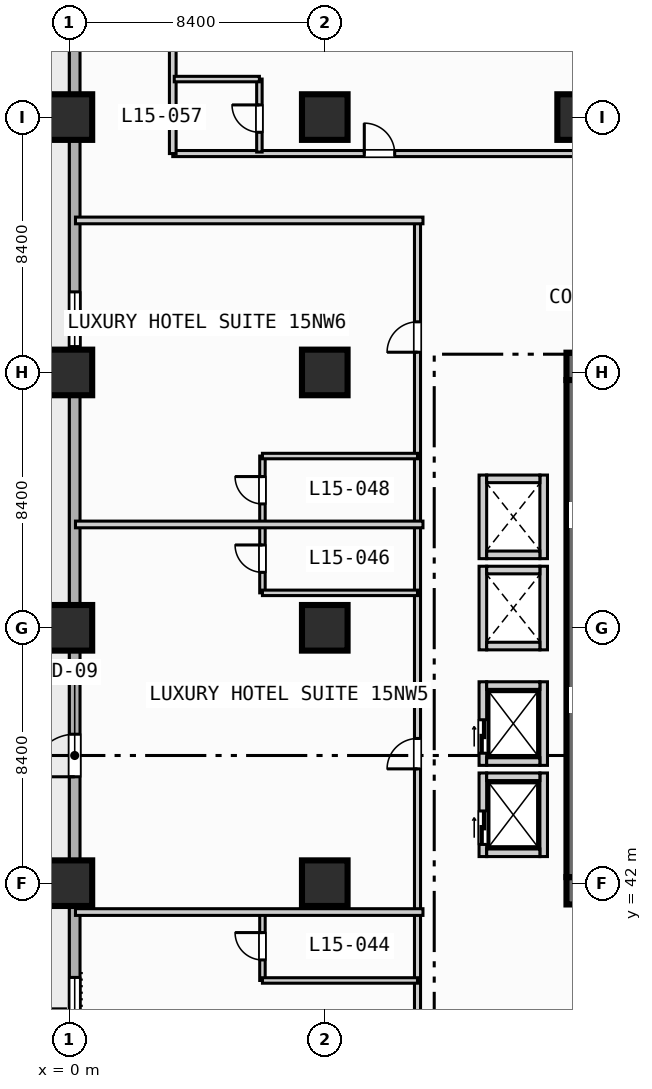
"""IFC4 building model, lengths in metres.
Left out: names, types, materials, properties, quantities, classifications, styles, units other than length and angle.
Written with IfcOpenShell. Run it as: python <this file> out.ifc"""

import sys

from ifc_helpers import new_model, si_unit, direction, frame, frame_2d, origin, origin_2d, place, context, subcontext, project, spatial, rectangle, extrude, element, fill, save


model = new_model("IFC4")
c1 = context("Model", 3, precision=1e-05, world=origin(), true_north=direction((0.0, 1.0)))
c2 = subcontext(c1, "Body", "Model", "MODEL_VIEW")
j1 = project(units=[si_unit("LENGTHUNIT", "METRE"), si_unit("PLANEANGLEUNIT", "RADIAN")], contexts=[c1])
p1 = place(None, origin())
s1 = spatial("IfcSite", under=j1, at=p1, CompositionType="ELEMENT")
p2 = place(p1, origin())
s2 = spatial("IfcBuilding", under=s1, at=p2, CompositionType="ELEMENT")
p3 = place(p2, frame((0.0, 0.0, 66.2)))
s3 = spatial("IfcBuildingStorey", under=s2, at=p3, CompositionType="ELEMENT", Elevation=66.2)
for number, where, z_axis, x_axis in (
    (1, (16.35, 41.75, 0.0), (0.0, 0.0, 1.0), (1.0, 0.0, 0.0)),
    (2, (16.35, 59.0, 0.0), (0.0, 0.0, 1.0), (1.0, 0.0, 0.0)),
):
    element("IfcWall", number, at=place(p3, frame(where, z_axis=z_axis, x_axis=x_axis)), inside=s3, PredefinedType="SHEAR", context=c2, shape_type="SweptSolid", body=[
        extrude(rectangle(XDim=1.65, YDim=0.9, at=frame_2d((0.825, 0.0))), origin(), (0.0, 0.0, 1.0), 3.55),
    ])
p4 = place(p3, frame((16.8, 42.2, 0.0), z_axis=(0.0, 0.0, 1.0), x_axis=(0.0, 1.0, 0.0)))
e3 = element("IfcWall", 3, at=p4, inside=s3, PredefinedType="SHEAR", context=c2, shape_type="SweptSolid", body=[
    extrude(rectangle(XDim=16.35, YDim=0.9, at=frame_2d((8.175, 0.0))), origin(), (0.0, 0.0, 1.0), 3.55),
])
for number, where, z_axis, x_axis in (
    (4, (0.0, 42.0, 0.0), (0.0, 0.0, 1.0), (1.0, 0.0, 0.0)),
    (5, (0.0, 50.4, 0.0), (0.0, 0.0, 1.0), (1.0, 0.0, 0.0)),
    (6, (0.0, 58.8, 0.0), (0.0, 0.0, 1.0), (1.0, 0.0, 0.0)),
    (7, (0.0, 67.2, 0.0), (0.0, 0.0, 1.0), (1.0, 0.0, 0.0)),
    (8, (8.4, 42.0, 0.0), (0.0, 0.0, 1.0), (1.0, 0.0, 0.0)),
    (9, (8.4, 50.4, 0.0), (0.0, 0.0, 1.0), (1.0, 0.0, 0.0)),
    (10, (8.4, 58.8, 0.0), (0.0, 0.0, 1.0), (1.0, 0.0, 0.0)),
    (11, (8.4, 67.2, 0.0), (0.0, 0.0, 1.0), (1.0, 0.0, 0.0)),
    (12, (16.8, 67.2, 0.0), (0.0, 0.0, 1.0), (1.0, 0.0, 0.0)),
):
    element("IfcColumn", number, at=place(p3, frame(where, z_axis=z_axis, x_axis=x_axis)), inside=s3, PredefinedType="COLUMN", context=c2, shape_type="SweptSolid", body=[
        extrude(rectangle(XDim=1.5, YDim=1.5, at=origin_2d()), origin(), (0.0, 0.0, 1.0), 3.8),
    ])
p5 = place(p3, frame((0.175, 3.175, 0.0), z_axis=(0.0, 0.0, 1.0), x_axis=(0.0, 1.0, 0.0)))
e13 = element("IfcWall", 13, at=p5, inside=s3, PredefinedType="STANDARD", context=c2, shape_type="SweptSolid", body=[
    extrude(rectangle(XDim=86.05, YDim=0.35, at=frame_2d((43.025, 0.0))), origin(), (0.0, 0.0, 1.0), 3.55),
])
p6 = place(p5, frame((42.325, 0.0, 0.0)))
e14 = element("IfcOpeningElement", 14, at=p6, cuts=e13, PredefinedType="OPENING", context=c2, shape_type="SweptSolid", body=[
    extrude(rectangle(XDim=1.4, YDim=2.2, at=frame_2d((0.7, 1.1))), frame((0.0, 0.185, 0.0), z_axis=(0.0, -1.0, 0.0), x_axis=(1.0, 0.0, 0.0)), (0.0, 0.0, 1.0), 0.37),
])
p7 = place(p5, frame((8.325, 0.0, 0.85)))
e15 = element("IfcOpeningElement", 15, at=p7, cuts=e13, PredefinedType="OPENING", context=c2, shape_type="SweptSolid", body=[
    extrude(rectangle(XDim=2.2, YDim=1.8, at=frame_2d((1.1, 0.9))), frame((0.0, 0.185, 0.0), z_axis=(0.0, -1.0, 0.0), x_axis=(1.0, 0.0, 0.0)), (0.0, 0.0, 1.0), 0.37),
])
p8 = place(p5, frame((16.725, 0.0, 0.85)))
e16 = element("IfcOpeningElement", 16, at=p8, cuts=e13, PredefinedType="OPENING", context=c2, shape_type="SweptSolid", body=[
    extrude(rectangle(XDim=2.2, YDim=1.8, at=frame_2d((1.1, 0.9))), frame((0.0, 0.185, 0.0), z_axis=(0.0, -1.0, 0.0), x_axis=(1.0, 0.0, 0.0)), (0.0, 0.0, 1.0), 0.37),
])
p9 = place(p5, frame((25.125, 0.0, 0.85)))
e17 = element("IfcOpeningElement", 17, at=p9, cuts=e13, PredefinedType="OPENING", context=c2, shape_type="SweptSolid", body=[
    extrude(rectangle(XDim=2.2, YDim=1.8, at=frame_2d((1.1, 0.9))), frame((0.0, 0.185, 0.0), z_axis=(0.0, -1.0, 0.0), x_axis=(1.0, 0.0, 0.0)), (0.0, 0.0, 1.0), 0.37),
])
p10 = place(p5, frame((33.525, 0.0, 0.85)))
e18 = element("IfcOpeningElement", 18, at=p10, cuts=e13, PredefinedType="OPENING", context=c2, shape_type="SweptSolid", body=[
    extrude(rectangle(XDim=2.2, YDim=1.8, at=frame_2d((1.1, 0.9))), frame((0.0, 0.185, 0.0), z_axis=(0.0, -1.0, 0.0), x_axis=(1.0, 0.0, 0.0)), (0.0, 0.0, 1.0), 0.37),
])
p11 = place(p5, frame((2.375, 0.0, 0.85)))
e19 = element("IfcOpeningElement", 19, at=p11, cuts=e13, PredefinedType="OPENING", context=c2, shape_type="SweptSolid", body=[
    extrude(rectangle(XDim=1.8, YDim=1.8, at=frame_2d((0.9, 0.9))), frame((0.0, 0.185, 0.0), z_axis=(0.0, -1.0, 0.0), x_axis=(1.0, 0.0, 0.0)), (0.0, 0.0, 1.0), 0.37),
])
p12 = place(p5, frame((56.475, 0.0, 0.85)))
e20 = element("IfcOpeningElement", 20, at=p12, cuts=e13, PredefinedType="OPENING", context=c2, shape_type="SweptSolid", body=[
    extrude(rectangle(XDim=1.8, YDim=1.8, at=frame_2d((0.9, 0.9))), frame((0.0, 0.185, 0.0), z_axis=(0.0, -1.0, 0.0), x_axis=(1.0, 0.0, 0.0)), (0.0, 0.0, 1.0), 0.37),
])
p13 = place(p3, frame((13.6, 42.875, 0.0), z_axis=(0.0, 0.0, 1.0), x_axis=(0.0, 1.0, 0.0)))
e21 = element("IfcWall", 21, at=p13, inside=s3, PredefinedType="SOLIDWALL", context=c2, shape_type="SweptSolid", body=[
    extrude(rectangle(XDim=2.75, YDim=0.25, at=frame_2d((1.375, 0.0))), origin(), (0.0, 0.0, 1.0), 3.55),
])
p14 = place(p13, frame((0.4, 0.0, 0.0)))
e22 = element("IfcOpeningElement", 22, at=p14, cuts=e21, PredefinedType="OPENING", context=c2, shape_type="SweptSolid", body=[
    extrude(rectangle(XDim=1.1, YDim=2.15, at=frame_2d((0.55, 1.075))), frame((0.0, 0.135, 0.0), z_axis=(0.0, -1.0, 0.0), x_axis=(1.0, 0.0, 0.0)), (0.0, 0.0, 1.0), 0.27),
])
p15 = place(p3, frame((15.6, 42.875, 0.0), z_axis=(0.0, 0.0, 1.0), x_axis=(0.0, 1.0, 0.0)))
e23 = element("IfcWall", 23, at=p15, inside=s3, PredefinedType="SOLIDWALL", context=c2, shape_type="SweptSolid", body=[
    extrude(rectangle(XDim=2.75, YDim=0.25, at=frame_2d((1.375, 0.0))), origin(), (0.0, 0.0, 1.0), 3.55),
])
for number, where, z_axis, x_axis in (
    (24, (13.725, 43.0, 0.0), (0.0, 0.0, 1.0), (1.0, 0.0, 0.0)),
    (25, (13.725, 45.5, 0.0), (0.0, 0.0, 1.0), (1.0, 0.0, 0.0)),
):
    element("IfcWall", number, at=place(p3, frame(where, z_axis=z_axis, x_axis=x_axis)), inside=s3, PredefinedType="SOLIDWALL", context=c2, shape_type="SweptSolid", body=[
        extrude(rectangle(XDim=1.75, YDim=0.25, at=frame_2d((0.875, 0.0))), origin(), (0.0, 0.0, 1.0), 3.55),
    ])
p16 = place(p3, frame((13.6, 45.875, 0.0), z_axis=(0.0, 0.0, 1.0), x_axis=(0.0, 1.0, 0.0)))
e26 = element("IfcWall", 26, at=p16, inside=s3, PredefinedType="SOLIDWALL", context=c2, shape_type="SweptSolid", body=[
    extrude(rectangle(XDim=2.75, YDim=0.25, at=frame_2d((1.375, 0.0))), origin(), (0.0, 0.0, 1.0), 3.55),
])
p17 = place(p16, frame((0.4, 0.0, 0.0)))
e27 = element("IfcOpeningElement", 27, at=p17, cuts=e26, PredefinedType="OPENING", context=c2, shape_type="SweptSolid", body=[
    extrude(rectangle(XDim=1.1, YDim=2.15, at=frame_2d((0.55, 1.075))), frame((0.0, 0.135, 0.0), z_axis=(0.0, -1.0, 0.0), x_axis=(1.0, 0.0, 0.0)), (0.0, 0.0, 1.0), 0.27),
])
p18 = place(p3, frame((15.6, 45.875, 0.0), z_axis=(0.0, 0.0, 1.0), x_axis=(0.0, 1.0, 0.0)))
e28 = element("IfcWall", 28, at=p18, inside=s3, PredefinedType="SOLIDWALL", context=c2, shape_type="SweptSolid", body=[
    extrude(rectangle(XDim=2.75, YDim=0.25, at=frame_2d((1.375, 0.0))), origin(), (0.0, 0.0, 1.0), 3.55),
])
for number, where, z_axis, x_axis in (
    (29, (13.725, 46.0, 0.0), (0.0, 0.0, 1.0), (1.0, 0.0, 0.0)),
    (30, (13.725, 48.5, 0.0), (0.0, 0.0, 1.0), (1.0, 0.0, 0.0)),
):
    element("IfcWall", number, at=place(p3, frame(where, z_axis=z_axis, x_axis=x_axis)), inside=s3, PredefinedType="SOLIDWALL", context=c2, shape_type="SweptSolid", body=[
        extrude(rectangle(XDim=1.75, YDim=0.25, at=frame_2d((0.875, 0.0))), origin(), (0.0, 0.0, 1.0), 3.55),
    ])
for number, where, z_axis, x_axis in (
    (31, (13.6, 49.675, 0.0), (0.0, 0.0, 1.0), (0.0, 1.0, 0.0)),
    (32, (15.6, 49.675, 0.0), (0.0, 0.0, 1.0), (0.0, 1.0, 0.0)),
):
    element("IfcWall", number, at=place(p3, frame(where, z_axis=z_axis, x_axis=x_axis)), inside=s3, PredefinedType="SOLIDWALL", context=c2, shape_type="SweptSolid", body=[
        extrude(rectangle(XDim=2.75, YDim=0.25, at=frame_2d((1.375, 0.0))), origin(), (0.0, 0.0, 1.0), 3.55),
    ])
for number, where, z_axis, x_axis in (
    (33, (13.725, 49.8, 0.0), (0.0, 0.0, 1.0), (1.0, 0.0, 0.0)),
    (34, (13.725, 52.3, 0.0), (0.0, 0.0, 1.0), (1.0, 0.0, 0.0)),
):
    element("IfcWall", number, at=place(p3, frame(where, z_axis=z_axis, x_axis=x_axis)), inside=s3, PredefinedType="SOLIDWALL", context=c2, shape_type="SweptSolid", body=[
        extrude(rectangle(XDim=1.75, YDim=0.25, at=frame_2d((0.875, 0.0))), origin(), (0.0, 0.0, 1.0), 3.55),
    ])
for number, where, z_axis, x_axis in (
    (35, (13.6, 52.675, 0.0), (0.0, 0.0, 1.0), (0.0, 1.0, 0.0)),
    (36, (15.6, 52.675, 0.0), (0.0, 0.0, 1.0), (0.0, 1.0, 0.0)),
):
    element("IfcWall", number, at=place(p3, frame(where, z_axis=z_axis, x_axis=x_axis)), inside=s3, PredefinedType="SOLIDWALL", context=c2, shape_type="SweptSolid", body=[
        extrude(rectangle(XDim=2.75, YDim=0.25, at=frame_2d((1.375, 0.0))), origin(), (0.0, 0.0, 1.0), 3.55),
    ])
for number, where, z_axis, x_axis in (
    (37, (13.725, 52.8, 0.0), (0.0, 0.0, 1.0), (1.0, 0.0, 0.0)),
    (38, (13.725, 55.3, 0.0), (0.0, 0.0, 1.0), (1.0, 0.0, 0.0)),
):
    element("IfcWall", number, at=place(p3, frame(where, z_axis=z_axis, x_axis=x_axis)), inside=s3, PredefinedType="SOLIDWALL", context=c2, shape_type="SweptSolid", body=[
        extrude(rectangle(XDim=1.75, YDim=0.25, at=frame_2d((0.875, 0.0))), origin(), (0.0, 0.0, 1.0), 3.55),
    ])
p19 = place(p3, frame((11.45, 3.4, 0.0), z_axis=(0.0, 0.0, 1.0), x_axis=(0.0, 1.0, 0.0)))
e39 = element("IfcWall", 39, at=p19, inside=s3, PredefinedType="PARTITIONING", context=c2, shape_type="SweptSolid", body=[
    extrude(rectangle(XDim=60.4, YDim=0.2, at=frame_2d((30.2, 0.0))), origin(), (0.0, 0.0, 1.0), 3.55),
])
p20 = place(p19, frame((4.465, 0.0, 0.0)))
e40 = element("IfcOpeningElement", 40, at=p20, cuts=e39, PredefinedType="OPENING", context=c2, shape_type="SweptSolid", body=[
    extrude(rectangle(XDim=1.0, YDim=2.15, at=frame_2d((0.5, 1.075))), frame((0.0, 0.11, 0.0), z_axis=(0.0, -1.0, 0.0), x_axis=(1.0, 0.0, 0.0)), (0.0, 0.0, 1.0), 0.22),
])
p21 = place(p19, frame((14.665, 0.0, 0.0)))
e41 = element("IfcOpeningElement", 41, at=p21, cuts=e39, PredefinedType="OPENING", context=c2, shape_type="SweptSolid", body=[
    extrude(rectangle(XDim=1.0, YDim=2.15, at=frame_2d((0.5, 1.075))), frame((0.0, 0.11, 0.0), z_axis=(0.0, -1.0, 0.0), x_axis=(1.0, 0.0, 0.0)), (0.0, 0.0, 1.0), 0.22),
])
p22 = place(p19, frame((22.535, 0.0, 0.0)))
e42 = element("IfcOpeningElement", 42, at=p22, cuts=e39, PredefinedType="OPENING", context=c2, shape_type="SweptSolid", body=[
    extrude(rectangle(XDim=1.0, YDim=2.15, at=frame_2d((0.5, 1.075))), frame((0.0, 0.11, 0.0), z_axis=(0.0, -1.0, 0.0), x_axis=(1.0, 0.0, 0.0)), (0.0, 0.0, 1.0), 0.22),
])
p23 = place(p19, frame((31.16, 0.0, 0.0)))
e43 = element("IfcOpeningElement", 43, at=p23, cuts=e39, PredefinedType="OPENING", context=c2, shape_type="SweptSolid", body=[
    extrude(rectangle(XDim=1.0, YDim=2.15, at=frame_2d((0.5, 1.075))), frame((0.0, 0.11, 0.0), z_axis=(0.0, -1.0, 0.0), x_axis=(1.0, 0.0, 0.0)), (0.0, 0.0, 1.0), 0.22),
])
p24 = place(p19, frame((42.36, 0.0, 0.0)))
e44 = element("IfcOpeningElement", 44, at=p24, cuts=e39, PredefinedType="OPENING", context=c2, shape_type="SweptSolid", body=[
    extrude(rectangle(XDim=1.0, YDim=2.15, at=frame_2d((0.5, 1.075))), frame((0.0, 0.11, 0.0), z_axis=(0.0, -1.0, 0.0), x_axis=(1.0, 0.0, 0.0)), (0.0, 0.0, 1.0), 0.22),
])
p25 = place(p19, frame((56.065, 0.0, 0.0)))
e45 = element("IfcOpeningElement", 45, at=p25, cuts=e39, PredefinedType="OPENING", context=c2, shape_type="SweptSolid", body=[
    extrude(rectangle(XDim=1.0, YDim=2.15, at=frame_2d((0.5, 1.075))), frame((0.0, 0.11, 0.0), z_axis=(0.0, -1.0, 0.0), x_axis=(1.0, 0.0, 0.0)), (0.0, 0.0, 1.0), 0.22),
])
p26 = place(p3, frame((6.35, 38.8, 0.0), z_axis=(0.0, 0.0, 1.0), x_axis=(0.0, 1.0, 0.0)))
e46 = element("IfcWall", 46, at=p26, inside=s3, PredefinedType="PLUMBINGWALL", context=c2, shape_type="SweptSolid", body=[
    extrude(rectangle(XDim=2.25, YDim=0.18, at=frame_2d((1.125, 0.0))), origin(), (0.0, 0.0, 1.0), 3.55),
])
p27 = place(p26, frame((0.675, 0.0, 0.0)))
e47 = element("IfcOpeningElement", 47, at=p27, cuts=e46, PredefinedType="OPENING", context=c2, shape_type="SweptSolid", body=[
    extrude(rectangle(XDim=0.9, YDim=2.1, at=frame_2d((0.45, 1.05))), frame((0.0, 0.1, 0.0), z_axis=(0.0, -1.0, 0.0), x_axis=(1.0, 0.0, 0.0)), (0.0, 0.0, 1.0), 0.2),
])
p28 = place(p3, frame((6.35, 38.8, 0.0), z_axis=(0.0, 0.0, 1.0), x_axis=(1.0, 0.0, 0.0)))
e48 = element("IfcWall", 48, at=p28, inside=s3, PredefinedType="PLUMBINGWALL", context=c2, shape_type="SweptSolid", body=[
    extrude(rectangle(XDim=5.1, YDim=0.18, at=frame_2d((2.55, 0.0))), origin(), (0.0, 0.0, 1.0), 3.55),
])
p29 = place(p3, frame((0.2, 41.05, 0.0), z_axis=(0.0, 0.0, 1.0), x_axis=(1.0, 0.0, 0.0)))
e49 = element("IfcWall", 49, at=p29, inside=s3, PredefinedType="PARTITIONING", context=c2, shape_type="SweptSolid", body=[
    extrude(rectangle(XDim=11.43, YDim=0.22, at=frame_2d((5.715, 0.0))), origin(), (0.0, 0.0, 1.0), 3.55),
])
p30 = place(p3, frame((6.35, 51.55, 0.0), z_axis=(0.0, 0.0, 1.0), x_axis=(0.0, 1.0, 0.0)))
e50 = element("IfcWall", 50, at=p30, inside=s3, PredefinedType="PLUMBINGWALL", context=c2, shape_type="SweptSolid", body=[
    extrude(rectangle(XDim=4.5, YDim=0.18, at=frame_2d((2.25, 0.0))), origin(), (0.0, 0.0, 1.0), 3.55),
])
p31 = place(p30, frame((0.675, 0.0, 0.0)))
e51 = element("IfcOpeningElement", 51, at=p31, cuts=e50, PredefinedType="OPENING", context=c2, shape_type="SweptSolid", body=[
    extrude(rectangle(XDim=0.9, YDim=2.1, at=frame_2d((0.45, 1.05))), frame((0.0, 0.1, 0.0), z_axis=(0.0, -1.0, 0.0), x_axis=(1.0, 0.0, 0.0)), (0.0, 0.0, 1.0), 0.2),
])
p32 = place(p30, frame((2.925, 0.0, 0.0)))
e52 = element("IfcOpeningElement", 52, at=p32, cuts=e50, PredefinedType="OPENING", context=c2, shape_type="SweptSolid", body=[
    extrude(rectangle(XDim=0.9, YDim=2.1, at=frame_2d((0.45, 1.05))), frame((0.0, 0.1, 0.0), z_axis=(0.0, -1.0, 0.0), x_axis=(1.0, 0.0, 0.0)), (0.0, 0.0, 1.0), 0.2),
])
p33 = place(p3, frame((6.35, 51.55, 0.0), z_axis=(0.0, 0.0, 1.0), x_axis=(1.0, 0.0, 0.0)))
e53 = element("IfcWall", 53, at=p33, inside=s3, PredefinedType="PLUMBINGWALL", context=c2, shape_type="SweptSolid", body=[
    extrude(rectangle(XDim=5.1, YDim=0.18, at=frame_2d((2.55, 0.0))), origin(), (0.0, 0.0, 1.0), 3.55),
])
for number, where, z_axis, x_axis in (
    (54, (0.2, 53.8, 0.0), (0.0, 0.0, 1.0), (1.0, 0.0, 0.0)),
    (55, (0.2, 63.8, 0.0), (0.0, 0.0, 1.0), (1.0, 0.0, 0.0)),
):
    element("IfcWall", number, at=place(p3, frame(where, z_axis=z_axis, x_axis=x_axis)), inside=s3, PredefinedType="PARTITIONING", context=c2, shape_type="SweptSolid", body=[
        extrude(rectangle(XDim=11.43, YDim=0.22, at=frame_2d((5.715, 0.0))), origin(), (0.0, 0.0, 1.0), 3.55),
    ])
p34 = place(p3, frame((6.35, 56.05, 0.0), z_axis=(0.0, 0.0, 1.0), x_axis=(1.0, 0.0, 0.0)))
e56 = element("IfcWall", 56, at=p34, inside=s3, PredefinedType="PLUMBINGWALL", context=c2, shape_type="SweptSolid", body=[
    extrude(rectangle(XDim=5.1, YDim=0.18, at=frame_2d((2.55, 0.0))), origin(), (0.0, 0.0, 1.0), 3.55),
])
p35 = place(p3, frame((3.4, 66.0, 0.0), z_axis=(0.0, 0.0, 1.0), x_axis=(1.0, 0.0, 0.0)))
e57 = element("IfcWall", 57, at=p35, inside=s3, PredefinedType="PARTITIONING", context=c2, shape_type="SweptSolid", body=[
    extrude(rectangle(XDim=18.2, YDim=0.2, at=frame_2d((9.1, 0.0))), origin(), (0.0, 0.0, 1.0), 3.55),
])
p36 = place(p35, frame((6.3, 0.0, 0.0)))
e58 = element("IfcOpeningElement", 58, at=p36, cuts=e57, PredefinedType="OPENING", context=c2, shape_type="SweptSolid", body=[
    extrude(rectangle(XDim=1.0, YDim=2.15, at=frame_2d((0.5, 1.075))), frame((0.0, 0.11, 0.0), z_axis=(0.0, -1.0, 0.0), x_axis=(1.0, 0.0, 0.0)), (0.0, 0.0, 1.0), 0.22),
])
p37 = place(p3, frame((3.4, 66.0, 0.0), z_axis=(0.0, 0.0, 1.0), x_axis=(0.0, 1.0, 0.0)))
e59 = element("IfcWall", 59, at=p37, inside=s3, PredefinedType="PARTITIONING", context=c2, shape_type="SweptSolid", body=[
    extrude(rectangle(XDim=23.0, YDim=0.22, at=frame_2d((11.5, 0.0))), origin(), (0.0, 0.0, 1.0), 3.55),
])
p38 = place(p3, frame((6.25, 66.05, 0.0), z_axis=(0.0, 0.0, 1.0), x_axis=(0.0, 1.0, 0.0)))
e60 = element("IfcWall", 60, at=p38, inside=s3, PredefinedType="PLUMBINGWALL", context=c2, shape_type="SweptSolid", body=[
    extrude(rectangle(XDim=2.4, YDim=0.18, at=frame_2d((1.2, 0.0))), origin(), (0.0, 0.0, 1.0), 3.55),
])
p39 = place(p38, frame((0.65, 0.0, 0.0)))
e61 = element("IfcOpeningElement", 61, at=p39, cuts=e60, PredefinedType="OPENING", context=c2, shape_type="SweptSolid", body=[
    extrude(rectangle(XDim=0.9, YDim=2.1, at=frame_2d((0.45, 1.05))), frame((0.0, 0.1, 0.0), z_axis=(0.0, -1.0, 0.0), x_axis=(1.0, 0.0, 0.0)), (0.0, 0.0, 1.0), 0.2),
])
p40 = place(p3, frame((3.45, 68.45, 0.0), z_axis=(0.0, 0.0, 1.0), x_axis=(1.0, 0.0, 0.0)))
e62 = element("IfcWall", 62, at=p40, inside=s3, PredefinedType="PLUMBINGWALL", context=c2, shape_type="SweptSolid", body=[
    extrude(rectangle(XDim=2.8, YDim=0.18, at=frame_2d((1.4, 0.0))), origin(), (0.0, 0.0, 1.0), 3.55),
])
p41 = place(p6, origin())
e63 = element("IfcDoor", 63, at=p41, inside=s3, OperationType="SINGLE_SWING_LEFT", PredefinedType="DOOR", context=c2, shape_type="SweptSolid", body=[
    extrude(rectangle(XDim=1.4, YDim=2.2, at=frame_2d((0.7, 1.1))), frame((0.0, 0.025, 0.0), z_axis=(0.0, -1.0, 0.0), x_axis=(1.0, 0.0, 0.0)), (0.0, 0.0, 1.0), 0.05),
])
fill(e14, e63)
p42 = place(p10, origin())
e64 = element("IfcWindow", 64, at=p42, inside=s3, PartitioningType="SINGLE_PANEL", PredefinedType="WINDOW", context=c2, shape_type="SweptSolid", body=[
    extrude(rectangle(XDim=2.2, YDim=1.8, at=frame_2d((1.1, 0.9))), frame((0.0, 0.03, 0.0), z_axis=(0.0, -1.0, 0.0), x_axis=(1.0, 0.0, 0.0)), (0.0, 0.0, 1.0), 0.06),
])
fill(e18, e64)
p43 = place(p12, origin())
e65 = element("IfcWindow", 65, at=p43, inside=s3, PartitioningType="SINGLE_PANEL", PredefinedType="WINDOW", context=c2, shape_type="SweptSolid", body=[
    extrude(rectangle(XDim=1.8, YDim=1.8, at=frame_2d((0.9, 0.9))), frame((0.0, 0.03, 0.0), z_axis=(0.0, -1.0, 0.0), x_axis=(1.0, 0.0, 0.0)), (0.0, 0.0, 1.0), 0.06),
])
fill(e20, e65)
p44 = place(p14, origin())
e66 = element("IfcDoor", 66, at=p44, inside=s3, OperationType="SLIDING_TO_LEFT", PredefinedType="DOOR", context=c2, shape_type="SweptSolid", body=[
    extrude(rectangle(XDim=1.1, YDim=2.15, at=frame_2d((0.55, 1.075))), frame((0.0, 0.025, 0.0), z_axis=(0.0, -1.0, 0.0), x_axis=(1.0, 0.0, 0.0)), (0.0, 0.0, 1.0), 0.05),
])
fill(e22, e66)
p45 = place(p17, origin())
e67 = element("IfcDoor", 67, at=p45, inside=s3, OperationType="SLIDING_TO_LEFT", PredefinedType="DOOR", context=c2, shape_type="SweptSolid", body=[
    extrude(rectangle(XDim=1.1, YDim=2.15, at=frame_2d((0.55, 1.075))), frame((0.0, 0.025, 0.0), z_axis=(0.0, -1.0, 0.0), x_axis=(1.0, 0.0, 0.0)), (0.0, 0.0, 1.0), 0.05),
])
fill(e27, e67)
p46 = place(p24, origin())
e68 = element("IfcDoor", 68, at=p46, inside=s3, OperationType="SINGLE_SWING_LEFT", PredefinedType="DOOR", context=c2, shape_type="SweptSolid", body=[
    extrude(rectangle(XDim=1.0, YDim=2.15, at=frame_2d((0.5, 1.075))), frame((0.0, 0.025, 0.0), z_axis=(0.0, -1.0, 0.0), x_axis=(1.0, 0.0, 0.0)), (0.0, 0.0, 1.0), 0.05),
])
fill(e44, e68)
p47 = place(p25, origin())
e69 = element("IfcDoor", 69, at=p47, inside=s3, OperationType="SINGLE_SWING_LEFT", PredefinedType="DOOR", context=c2, shape_type="SweptSolid", body=[
    extrude(rectangle(XDim=1.0, YDim=2.15, at=frame_2d((0.5, 1.075))), frame((0.0, 0.025, 0.0), z_axis=(0.0, -1.0, 0.0), x_axis=(1.0, 0.0, 0.0)), (0.0, 0.0, 1.0), 0.05),
])
fill(e45, e69)
p48 = place(p27, origin())
e70 = element("IfcDoor", 70, at=p48, inside=s3, OperationType="SINGLE_SWING_RIGHT", PredefinedType="DOOR", context=c2, shape_type="SweptSolid", body=[
    extrude(rectangle(XDim=0.9, YDim=2.1, at=frame_2d((0.45, 1.05))), frame((0.0, 0.025, 0.0), z_axis=(0.0, -1.0, 0.0), x_axis=(1.0, 0.0, 0.0)), (0.0, 0.0, 1.0), 0.05),
])
fill(e47, e70)
p49 = place(p31, origin())
e71 = element("IfcDoor", 71, at=p49, inside=s3, OperationType="SINGLE_SWING_RIGHT", PredefinedType="DOOR", context=c2, shape_type="SweptSolid", body=[
    extrude(rectangle(XDim=0.9, YDim=2.1, at=frame_2d((0.45, 1.05))), frame((0.0, 0.025, 0.0), z_axis=(0.0, -1.0, 0.0), x_axis=(1.0, 0.0, 0.0)), (0.0, 0.0, 1.0), 0.05),
])
fill(e51, e71)
p50 = place(p32, origin())
e72 = element("IfcDoor", 72, at=p50, inside=s3, OperationType="SINGLE_SWING_RIGHT", PredefinedType="DOOR", context=c2, shape_type="SweptSolid", body=[
    extrude(rectangle(XDim=0.9, YDim=2.1, at=frame_2d((0.45, 1.05))), frame((0.0, 0.025, 0.0), z_axis=(0.0, -1.0, 0.0), x_axis=(1.0, 0.0, 0.0)), (0.0, 0.0, 1.0), 0.05),
])
fill(e52, e72)
p51 = place(p36, origin())
e73 = element("IfcDoor", 73, at=p51, inside=s3, OperationType="SINGLE_SWING_LEFT", PredefinedType="DOOR", context=c2, shape_type="SweptSolid", body=[
    extrude(rectangle(XDim=1.0, YDim=2.15, at=frame_2d((0.5, 1.075))), frame((0.0, 0.025, 0.0), z_axis=(0.0, -1.0, 0.0), x_axis=(1.0, 0.0, 0.0)), (0.0, 0.0, 1.0), 0.05),
])
fill(e58, e73)
p52 = place(p39, origin())
e74 = element("IfcDoor", 74, at=p52, inside=s3, OperationType="SINGLE_SWING_RIGHT", PredefinedType="DOOR", context=c2, shape_type="SweptSolid", body=[
    extrude(rectangle(XDim=0.9, YDim=2.1, at=frame_2d((0.45, 1.05))), frame((0.0, 0.025, 0.0), z_axis=(0.0, -1.0, 0.0), x_axis=(1.0, 0.0, 0.0)), (0.0, 0.0, 1.0), 0.05),
])
fill(e61, e74)
save(model, sys.argv[1])
